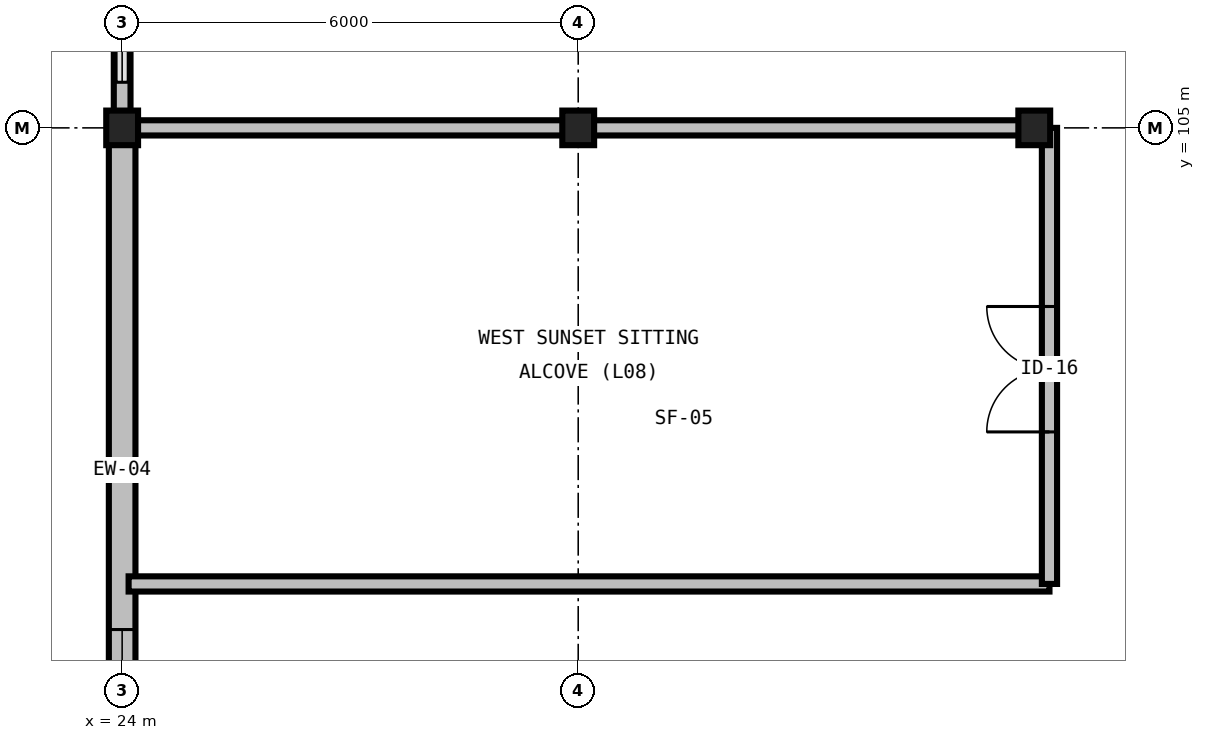
"""IFC4 building model, lengths in metres.
Left out: names, types, materials, properties, quantities, classifications, styles, units other than length and angle.
Written with IfcOpenShell. Run it as: python <this file> out.ifc"""

import sys

from ifc_helpers import new_model, si_unit, direction, frame, frame_2d, origin, origin_2d, place, context, subcontext, project, spatial, rectangle, i_section, extrude, element, fill, save


model = new_model("IFC4")
c1 = context("Model", 3, precision=1e-05, world=origin(), true_north=direction((0.0, 1.0)))
c2 = subcontext(c1, "Body", "Model", "MODEL_VIEW")
j1 = project(units=[si_unit("LENGTHUNIT", "METRE"), si_unit("PLANEANGLEUNIT", "RADIAN")], contexts=[c1])
p1 = place(None, origin())
s1 = spatial("IfcSite", under=j1, at=p1, CompositionType="ELEMENT")
p2 = place(p1, origin())
s2 = spatial("IfcBuilding", under=s1, at=p2, CompositionType="ELEMENT")
p3 = place(p2, frame((0.0, 0.0, 38.4)))
s3 = spatial("IfcBuildingStorey", under=s2, at=p3, CompositionType="ELEMENT", Elevation=38.4)
for number, where, z_axis, x_axis in (
    (1, (24.0, 105.0, 0.0), (0.0, 0.0, 1.0), (1.0, 0.0, 0.0)),
    (2, (30.0, 105.0, 0.0), (0.0, 0.0, 1.0), (1.0, 0.0, 0.0)),
    (3, (36.0, 105.0, 0.0), (0.0, 0.0, 1.0), (1.0, 0.0, 0.0)),
):
    element("IfcColumn", number, at=place(p3, frame(where, z_axis=z_axis, x_axis=x_axis)), inside=s3, PredefinedType="COLUMN", context=c2, shape_type="SweptSolid", body=[
        extrude(i_section(OverallWidth=0.419, OverallDepth=0.455, WebThickness=0.042, FlangeThickness=0.068, FilletRadius=0.031, at=origin_2d()), origin(), (0.0, 0.0, 1.0), 3.6),
    ])
p4 = place(p3, frame((24.0, 105.0, 0.0), z_axis=(0.0, 0.0, 1.0), x_axis=(0.0, -1.0, 0.0)))
e4 = element("IfcWall", 4, at=p4, inside=s3, PredefinedType="STANDARD", context=c2, shape_type="SweptSolid", body=[
    extrude(rectangle(XDim=9.0, YDim=0.35, at=frame_2d((4.5, 0.0))), origin(), (0.0, 0.0, 1.0), 2.981),
])
p5 = place(p4, frame((6.6, 0.0, 0.85)))
e5 = element("IfcOpeningElement", 5, at=p5, cuts=e4, PredefinedType="OPENING", context=c2, shape_type="SweptSolid", body=[
    extrude(rectangle(XDim=1.8, YDim=1.5, at=frame_2d((0.9, 0.75))), frame((0.0, 0.19, 0.0), z_axis=(0.0, -1.0, 0.0), x_axis=(1.0, 0.0, 0.0)), (0.0, 0.0, 1.0), 0.38),
])
p6 = place(p3, frame((24.0, 117.0, 0.0), z_axis=(0.0, 0.0, 1.0), x_axis=(0.0, -1.0, 0.0)))
e6 = element("IfcWall", 6, at=p6, inside=s3, PredefinedType="PARAPET", context=c2, shape_type="SweptSolid", body=[
    extrude(rectangle(XDim=12.0, YDim=0.22, at=frame_2d((6.0, 0.0))), origin(), (0.0, 0.0, 1.0), 0.2),
])
p7 = place(p3, frame((24.085, 99.0, 0.0), z_axis=(0.0, 0.0, 1.0), x_axis=(1.0, 0.0, 0.0)))
e7 = element("IfcWall", 7, at=p7, inside=s3, PredefinedType="PARTITIONING", context=c2, shape_type="SweptSolid", body=[
    extrude(rectangle(XDim=12.115, YDim=0.2, at=frame_2d((6.057, 0.0))), origin(), (0.0, 0.0, 1.0), 3.29),
])
p8 = place(p3, frame((36.2, 99.0, 0.0), z_axis=(0.0, 0.0, 1.0), x_axis=(0.0, 1.0, 0.0)))
e8 = element("IfcWall", 8, at=p8, inside=s3, PredefinedType="PARTITIONING", context=c2, shape_type="SweptSolid", body=[
    extrude(rectangle(XDim=6.0, YDim=0.2, at=frame_2d((3.0, 0.0))), origin(), (0.0, 0.0, 1.0), 3.29),
])
p9 = place(p8, frame((2.0, 0.0, 0.0)))
e9 = element("IfcOpeningElement", 9, at=p9, cuts=e8, PredefinedType="OPENING", context=c2, shape_type="SweptSolid", body=[
    extrude(rectangle(XDim=1.65, YDim=2.25, at=frame_2d((0.825, 1.125))), frame((0.0, 0.115, 0.0), z_axis=(0.0, -1.0, 0.0), x_axis=(1.0, 0.0, 0.0)), (0.0, 0.0, 1.0), 0.23),
])
p10 = place(p3, frame((36.2, 105.0, 0.0), z_axis=(0.0, 0.0, 1.0), x_axis=(-1.0, 0.0, 0.0)))
e10 = element("IfcWall", 10, at=p10, inside=s3, PredefinedType="PARTITIONING", context=c2, shape_type="SweptSolid", body=[
    extrude(rectangle(XDim=12.115, YDim=0.2, at=frame_2d((6.057, 0.0))), origin(), (0.0, 0.0, 1.0), 2.736),
])
p11 = place(p5, origin())
e11 = element("IfcWindow", 11, at=p11, inside=s3, PartitioningType="SINGLE_PANEL", PredefinedType="WINDOW", context=c2, shape_type="SweptSolid", body=[
    extrude(rectangle(XDim=1.8, YDim=1.5, at=frame_2d((0.9, 0.75))), frame((0.0, 0.03, 0.0), z_axis=(0.0, -1.0, 0.0), x_axis=(1.0, 0.0, 0.0)), (0.0, 0.0, 1.0), 0.06),
])
fill(e5, e11)
p12 = place(p9, origin())
e12 = element("IfcDoor", 12, at=p12, inside=s3, OperationType="DOUBLE_DOOR_SINGLE_SWING", PredefinedType="DOOR", context=c2, shape_type="SweptSolid", body=[
    extrude(rectangle(XDim=1.65, YDim=2.25, at=frame_2d((0.825, 1.125))), frame((0.0, 0.025, 0.0), z_axis=(0.0, -1.0, 0.0), x_axis=(1.0, 0.0, 0.0)), (0.0, 0.0, 1.0), 0.05),
])
fill(e9, e12)
save(model, sys.argv[1])
